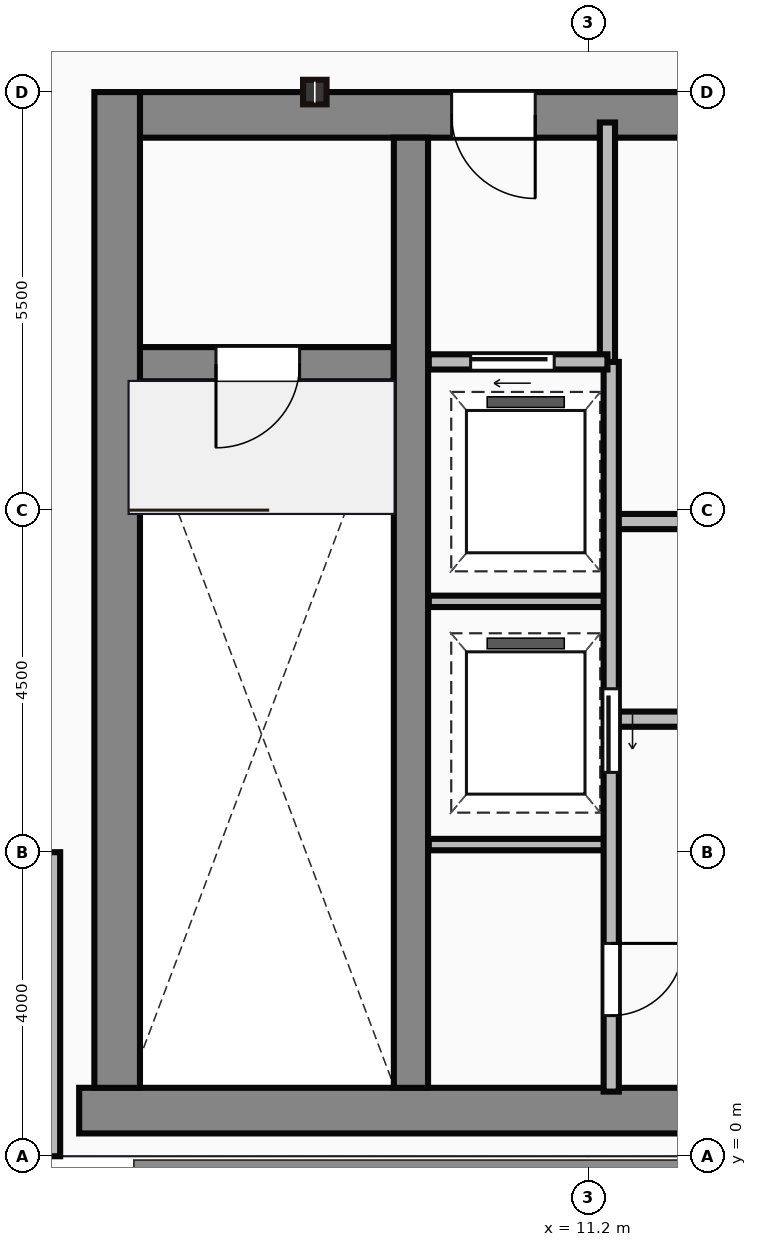
"""IFC4 building model, lengths in metres.
Left out: names, types, materials, properties, quantities, classifications, styles, units other than length and angle.
Written with IfcOpenShell. Run it as: python <this file> out.ifc"""

import sys

from ifc_helpers import new_model, si_unit, direction, frame, frame_2d, origin, origin_2d, place, context, subcontext, project, spatial, rectangle, i_section, extrude, source, transform, mapped, element, fill, save


model = new_model("IFC4")
c1 = context("Model", 3, precision=1e-05, world=origin(), true_north=direction((0.0, 1.0)))
c2 = subcontext(c1, "Body", "Model", "MODEL_VIEW")
j1 = project(units=[si_unit("LENGTHUNIT", "METRE"), si_unit("PLANEANGLEUNIT", "RADIAN")], contexts=[c1])
p1 = place(None, origin())
s1 = spatial("IfcSite", under=j1, at=p1, CompositionType="ELEMENT")
p2 = place(p1, origin())
s2 = spatial("IfcBuilding", under=s1, at=p2, CompositionType="ELEMENT")
p3 = place(p2, frame((0.0, 0.0, 311.25)))
s3 = spatial("IfcBuildingStorey", under=s2, at=p3, CompositionType="ELEMENT", Elevation=311.25)
m1 = source(origin(), c2, "Body", "SweptSolid", [
    extrude(rectangle(XDim=29.5, YDim=0.6, at=frame_2d((14.75, 0.0))), origin(), (0.0, 0.0, 1.0), 3.8),
])
p4 = place(p3, frame((4.5, 0.6, 0.0), z_axis=(0.0, 0.0, 1.0), x_axis=(1.0, 0.0, 0.0)))
e1 = element("IfcWall", 1, at=p4, inside=s3, PredefinedType="SHEAR", context=c2, shape_type="MappedRepresentation", body=[
    mapped(m1, transform((0.0, 0.0, 0.0))),
])
m2 = source(origin(), c2, "Body", "SweptSolid", [
    extrude(rectangle(XDim=13.1, YDim=0.6, at=frame_2d((6.55, 0.0))), origin(), (0.0, 0.0, 1.0), 3.8),
])
p5 = place(p3, frame((5.0, 0.9, 0.0), z_axis=(0.0, 0.0, 1.0), x_axis=(0.0, 1.0, 0.0)))
e2 = element("IfcWall", 2, at=p5, inside=s3, PredefinedType="SHEAR", context=c2, shape_type="MappedRepresentation", body=[
    mapped(m2, transform((0.0, 0.0, 0.0))),
])
m3 = source(origin(), c2, "Body", "SweptSolid", [
    extrude(rectangle(XDim=9.1, YDim=0.6, at=frame_2d((4.55, 0.0))), origin(), (0.0, 0.0, 1.0), 3.8),
])
p6 = place(p3, frame((5.3, 13.7, 0.0), z_axis=(0.0, 0.0, 1.0), x_axis=(1.0, 0.0, 0.0)))
e3 = element("IfcWall", 3, at=p6, inside=s3, PredefinedType="SHEAR", context=c2, shape_type="MappedRepresentation", body=[
    mapped(m3, transform((0.0, 0.0, 0.0))),
])
p7 = place(p6, frame((4.1, 0.0, 0.0)))
e4 = element("IfcOpeningElement", 4, at=p7, cuts=e3, PredefinedType="OPENING", context=c2, shape_type="SweptSolid", body=[
    extrude(rectangle(XDim=1.1, YDim=2.15, at=frame_2d((0.55, 1.075))), frame((0.0, 0.31, 0.0), z_axis=(0.0, -1.0, 0.0), x_axis=(1.0, 0.0, 0.0)), (0.0, 0.0, 1.0), 0.62),
])
m4 = source(origin(), c2, "Body", "SweptSolid", [
    extrude(rectangle(XDim=12.5, YDim=0.45, at=frame_2d((6.25, 0.0))), origin(), (0.0, 0.0, 1.0), 3.8),
])
p8 = place(p3, frame((8.865, 0.9, 0.0), z_axis=(0.0, 0.0, 1.0), x_axis=(0.0, 1.0, 0.0)))
e5 = element("IfcWall", 5, at=p8, inside=s3, PredefinedType="SHEAR", context=c2, shape_type="MappedRepresentation", body=[
    mapped(m4, transform((0.0, 0.0, 0.0))),
])
m5 = source(origin(), c2, "Body", "SweptSolid", [
    extrude(rectangle(XDim=3.39, YDim=0.45, at=frame_2d((1.695, 0.0))), origin(), (0.0, 0.0, 1.0), 3.8),
])
p9 = place(p3, frame((5.25, 10.42, 0.0), z_axis=(0.0, 0.0, 1.0), x_axis=(1.0, 0.0, 0.0)))
e6 = element("IfcWall", 6, at=p9, inside=s3, PredefinedType="SHEAR", context=c2, shape_type="MappedRepresentation", body=[
    mapped(m5, transform((0.0, 0.0, 0.0))),
])
p10 = place(p9, frame((1.05, 0.0, 0.0)))
e7 = element("IfcOpeningElement", 7, at=p10, cuts=e6, PredefinedType="OPENING", context=c2, shape_type="SweptSolid", body=[
    extrude(rectangle(XDim=1.1, YDim=2.15, at=frame_2d((0.55, 1.075))), frame((0.0, 0.235, 0.0), z_axis=(0.0, -1.0, 0.0), x_axis=(1.0, 0.0, 0.0)), (0.0, 0.0, 1.0), 0.47),
])
m6 = source(origin(), c2, "Body", "SweptSolid", [
    extrude(i_section(OverallWidth=0.309, OverallDepth=0.323, WebThickness=0.014, FlangeThickness=0.023, at=origin_2d()), origin(), (0.0, 0.0, 1.0), 3.8),
])
p11 = place(p3, frame((7.6, 14.0, 0.0), z_axis=(0.0, 0.0, 1.0), x_axis=(1.0, 0.0, 0.0)))
e8 = element("IfcColumn", 8, at=p11, inside=s3, PredefinedType="COLUMN", context=c2, shape_type="MappedRepresentation", body=[
    mapped(m6, transform((0.0, 0.0, 0.0))),
])
m7 = source(origin(), c2, "Body", "SweptSolid", [
    extrude(rectangle(XDim=4.0, YDim=0.25, at=frame_2d((2.0, 0.0))), origin(), (0.0, 0.0, 1.0), 3.5),
])
p12 = place(p3, frame((4.125, 4.0, 0.0), z_axis=(0.0, 0.0, 1.0), x_axis=(0.0, -1.0, 0.0)))
e9 = element("IfcWall", 9, at=p12, inside=s3, PredefinedType="STANDARD", context=c2, shape_type="MappedRepresentation", body=[
    mapped(m7, transform((0.0, 0.0, 0.0))),
])
m8 = source(origin(), c2, "Body", "SweptSolid", [
    extrude(rectangle(XDim=3.18, YDim=0.2, at=frame_2d((1.59, 0.0))), origin(), (0.0, 0.0, 1.0), 3.5),
])
p13 = place(p3, frame((11.45, 10.42, 0.0), z_axis=(0.0, 0.0, 1.0), x_axis=(0.0, 1.0, 0.0)))
e10 = element("IfcWall", 10, at=p13, inside=s3, PredefinedType="PARTITIONING", context=c2, shape_type="MappedRepresentation", body=[
    mapped(m8, transform((0.0, 0.0, 0.0))),
])
m9 = source(origin(), c2, "Body", "SweptSolid", [
    extrude(rectangle(XDim=2.35, YDim=0.2, at=frame_2d((1.175, 0.0))), origin(), (0.0, 0.0, 1.0), 3.5),
])
p14 = place(p3, frame((9.1, 10.45, 0.0), z_axis=(0.0, 0.0, 1.0), x_axis=(1.0, 0.0, 0.0)))
e11 = element("IfcWall", 11, at=p14, inside=s3, PredefinedType="PARTITIONING", context=c2, shape_type="MappedRepresentation", body=[
    mapped(m9, transform((0.0, 0.0, 0.0))),
])
p15 = place(p14, frame((0.55, 0.0, 0.0)))
e12 = element("IfcOpeningElement", 12, at=p15, cuts=e11, PredefinedType="OPENING", context=c2, shape_type="SweptSolid", body=[
    extrude(rectangle(XDim=1.1, YDim=2.15, at=frame_2d((0.55, 1.075))), frame((0.0, 0.11, 0.0), z_axis=(0.0, -1.0, 0.0), x_axis=(1.0, 0.0, 0.0)), (0.0, 0.0, 1.0), 0.22),
])
m10 = source(origin(), c2, "Body", "SweptSolid", [
    extrude(rectangle(XDim=9.6, YDim=0.2, at=frame_2d((4.8, 0.0))), origin(), (0.0, 0.0, 1.0), 3.5),
])
p16 = place(p3, frame((11.5, 0.85, 0.0), z_axis=(0.0, 0.0, 1.0), x_axis=(0.0, 1.0, 0.0)))
e13 = element("IfcWall", 13, at=p16, inside=s3, PredefinedType="PARTITIONING", context=c2, shape_type="MappedRepresentation", body=[
    mapped(m10, transform((0.0, 0.0, 0.0))),
])
p17 = place(p16, frame((4.2, 0.0, 0.0)))
e14 = element("IfcOpeningElement", 14, at=p17, cuts=e13, PredefinedType="OPENING", context=c2, shape_type="SweptSolid", body=[
    extrude(rectangle(XDim=1.1, YDim=2.15, at=frame_2d((0.55, 1.075))), frame((0.0, 0.11, 0.0), z_axis=(0.0, -1.0, 0.0), x_axis=(1.0, 0.0, 0.0)), (0.0, 0.0, 1.0), 0.22),
])
p18 = place(p16, frame((1.0, 0.0, 0.0)))
e15 = element("IfcOpeningElement", 15, at=p18, cuts=e13, PredefinedType="OPENING", context=c2, shape_type="SweptSolid", body=[
    extrude(rectangle(XDim=0.95, YDim=2.15, at=frame_2d((0.475, 1.075))), frame((0.0, 0.11, 0.0), z_axis=(0.0, -1.0, 0.0), x_axis=(1.0, 0.0, 0.0)), (0.0, 0.0, 1.0), 0.22),
])
m11 = source(origin(), c2, "Body", "SweptSolid", [
    extrude(rectangle(XDim=2.4, YDim=0.15, at=frame_2d((1.2, 0.0))), origin(), (0.0, 0.0, 1.0), 3.5),
])
for number, where, z_axis, x_axis in (
    (16, (9.1, 4.1, 0.0), (0.0, 0.0, 1.0), (1.0, 0.0, 0.0)),
    (17, (9.1, 7.3, 0.0), (0.0, 0.0, 1.0), (1.0, 0.0, 0.0)),
):
    element("IfcWall", number, at=place(p3, frame(where, z_axis=z_axis, x_axis=x_axis)), inside=s3, PredefinedType="PARTITIONING", context=c2, shape_type="MappedRepresentation", body=[
        mapped(m11, transform((0.0, 0.0, 0.0))),
    ])
m12 = source(origin(), c2, "Body", "SweptSolid", [
    extrude(rectangle(XDim=11.85, YDim=0.2, at=frame_2d((5.925, 0.0))), origin(), (0.0, 0.0, 1.0), 3.5),
])
p19 = place(p3, frame((11.55, 5.75, 0.0), z_axis=(0.0, 0.0, 1.0), x_axis=(1.0, 0.0, 0.0)))
e18 = element("IfcWall", 18, at=p19, inside=s3, PredefinedType="PARTITIONING", context=c2, shape_type="MappedRepresentation", body=[
    mapped(m12, transform((0.0, 0.0, 0.0))),
])
p20 = place(p19, frame((5.2, 0.0, 0.0)))
e19 = element("IfcOpeningElement", 19, at=p20, cuts=e18, PredefinedType="OPENING", context=c2, shape_type="SweptSolid", body=[
    extrude(rectangle(XDim=1.1, YDim=2.15, at=frame_2d((0.55, 1.075))), frame((0.0, 0.11, 0.0), z_axis=(0.0, -1.0, 0.0), x_axis=(1.0, 0.0, 0.0)), (0.0, 0.0, 1.0), 0.22),
])
p21 = place(p3, frame((11.55, 8.35, 0.0), z_axis=(0.0, 0.0, 1.0), x_axis=(1.0, 0.0, 0.0)))
e20 = element("IfcWall", 20, at=p21, inside=s3, PredefinedType="PARTITIONING", context=c2, shape_type="MappedRepresentation", body=[
    mapped(m12, transform((0.0, 0.0, 0.0))),
])
m13 = source(origin(), c2, "Body", "SweptSolid", [
    extrude(rectangle(XDim=1.1, YDim=2.15, at=frame_2d((0.55, 1.075))), frame((0.0, 0.025, 0.0), z_axis=(0.0, -1.0, 0.0), x_axis=(1.0, 0.0, 0.0)), (0.0, 0.0, 1.0), 0.05),
])
p22 = place(p10, frame((1.1, 0.0, 0.0), z_axis=(0.0, 0.0, 1.0), x_axis=(-1.0, 0.0, 0.0)))
e21 = element("IfcDoor", 21, at=p22, inside=s3, OperationType="SINGLE_SWING_LEFT", PredefinedType="DOOR", context=c2, shape_type="MappedRepresentation", body=[
    mapped(m13, transform((0.0, 0.0, 0.0))),
])
fill(e7, e21)
p23 = place(p7, origin())
e22 = element("IfcDoor", 22, at=p23, inside=s3, OperationType="SINGLE_SWING_RIGHT", PredefinedType="DOOR", context=c2, shape_type="MappedRepresentation", body=[
    mapped(m13, transform((0.0, 0.0, 0.0))),
])
fill(e4, e22)
p24 = place(p15, origin())
e23 = element("IfcDoor", 23, at=p24, inside=s3, OperationType="SLIDING_TO_LEFT", PredefinedType="DOOR", context=c2, shape_type="MappedRepresentation", body=[
    mapped(m13, transform((0.0, 0.0, 0.0))),
])
fill(e12, e23)
p25 = place(p17, frame((1.1, 0.0, 0.0), z_axis=(0.0, 0.0, 1.0), x_axis=(-1.0, 0.0, 0.0)))
e24 = element("IfcDoor", 24, at=p25, inside=s3, OperationType="SLIDING_TO_LEFT", PredefinedType="DOOR", context=c2, shape_type="MappedRepresentation", body=[
    mapped(m13, transform((0.0, 0.0, 0.0))),
])
fill(e14, e24)
m14 = source(origin(), c2, "Body", "SweptSolid", [
    extrude(rectangle(XDim=0.95, YDim=2.15, at=frame_2d((0.475, 1.075))), frame((0.0, 0.025, 0.0), z_axis=(0.0, -1.0, 0.0), x_axis=(1.0, 0.0, 0.0)), (0.0, 0.0, 1.0), 0.05),
])
p26 = place(p18, frame((0.95, 0.0, 0.0), z_axis=(0.0, 0.0, 1.0), x_axis=(-1.0, 0.0, 0.0)))
e25 = element("IfcDoor", 25, at=p26, inside=s3, OperationType="SINGLE_SWING_RIGHT", PredefinedType="DOOR", context=c2, shape_type="MappedRepresentation", body=[
    mapped(m14, transform((0.0, 0.0, 0.0))),
])
fill(e15, e25)
save(model, sys.argv[1])
